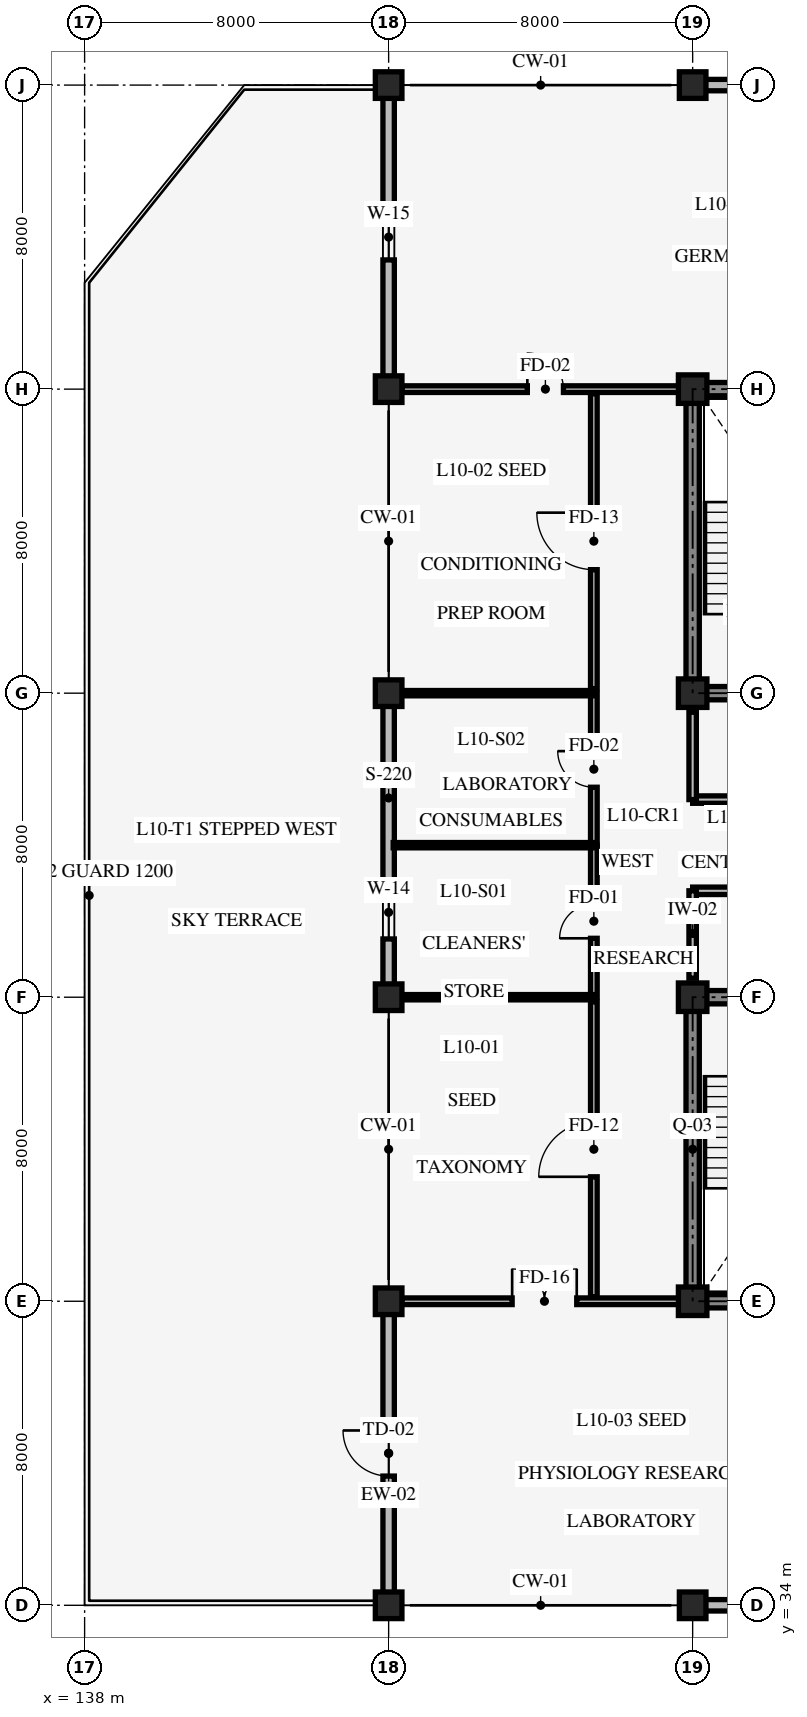
"""IFC4 building model, lengths in metres.
Left out: names, types, materials, properties, quantities, classifications, styles, units other than length and angle.
Written with IfcOpenShell. Run it as: python <this file> out.ifc"""

import sys

from ifc_helpers import new_model, si_unit, direction, frame, frame_2d, origin, origin_2d, place, context, subcontext, project, spatial, rectangle, extrude, element, fill, save


model = new_model("IFC4")
c1 = context("Model", 3, precision=1e-05, world=origin(), true_north=direction((0.0, 1.0)))
c2 = subcontext(c1, "Body", "Model", "MODEL_VIEW")
j1 = project(units=[si_unit("LENGTHUNIT", "METRE"), si_unit("PLANEANGLEUNIT", "RADIAN")], contexts=[c1])
p1 = place(None, origin())
s1 = spatial("IfcSite", under=j1, at=p1, CompositionType="ELEMENT")
p2 = place(p1, origin())
s2 = spatial("IfcBuilding", under=s1, at=p2, CompositionType="ELEMENT")
p3 = place(p2, frame((0.0, 0.0, 40.2)))
s3 = spatial("IfcBuildingStorey", under=s2, at=p3, CompositionType="ELEMENT", Elevation=40.2)
p4 = place(p3, frame((154.0, 42.0, 0.0), z_axis=(0.0, 0.0, 1.0), x_axis=(1.0, 0.0, 0.0)))
e1 = element("IfcWall", 1, at=p4, inside=s3, PredefinedType="SHEAR", context=c2, shape_type="SweptSolid", body=[
    extrude(rectangle(XDim=8.0, YDim=0.35, at=frame_2d((4.0, 0.0))), origin(), (0.0, 0.0, 1.0), 3.95),
])
p5 = place(p3, frame((162.0, 50.0, 0.0), z_axis=(0.0, 0.0, 1.0), x_axis=(-1.0, 0.0, 0.0)))
e2 = element("IfcWall", 2, at=p5, inside=s3, PredefinedType="SHEAR", context=c2, shape_type="SweptSolid", body=[
    extrude(rectangle(XDim=8.0, YDim=0.35, at=frame_2d((4.0, 0.0))), origin(), (0.0, 0.0, 1.0), 3.95),
])
p6 = place(p5, frame((5.3, 0.0, 0.0)))
e3 = element("IfcOpeningElement", 3, at=p6, cuts=e2, PredefinedType="OPENING", context=c2, shape_type="SweptSolid", body=[
    extrude(rectangle(XDim=1.3, YDim=2.15, at=frame_2d((0.65, 1.075))), frame((0.0, 0.185, 0.0), z_axis=(0.0, -1.0, 0.0), x_axis=(1.0, 0.0, 0.0)), (0.0, 0.0, 1.0), 0.37),
])
p7 = place(p5, frame((1.45, 0.0, 0.0)))
e4 = element("IfcOpeningElement", 4, at=p7, cuts=e2, PredefinedType="OPENING", context=c2, shape_type="SweptSolid", body=[
    extrude(rectangle(XDim=1.1, YDim=2.2, at=frame_2d((0.55, 1.1))), frame((0.0, 0.185, 0.0), z_axis=(0.0, -1.0, 0.0), x_axis=(1.0, 0.0, 0.0)), (0.0, 0.0, 1.0), 0.37),
])
p8 = place(p3, frame((154.0, 50.0, 0.0), z_axis=(0.0, 0.0, 1.0), x_axis=(0.0, -1.0, 0.0)))
e5 = element("IfcWall", 5, at=p8, inside=s3, PredefinedType="SHEAR", context=c2, shape_type="SweptSolid", body=[
    extrude(rectangle(XDim=8.0, YDim=0.35, at=frame_2d((4.0, 0.0))), origin(), (0.0, 0.0, 1.0), 3.95),
])
p9 = place(p3, frame((154.0, 58.0, 0.0), z_axis=(0.0, 0.0, 1.0), x_axis=(1.0, 0.0, 0.0)))
e6 = element("IfcWall", 6, at=p9, inside=s3, PredefinedType="SHEAR", context=c2, shape_type="SweptSolid", body=[
    extrude(rectangle(XDim=8.0, YDim=0.35, at=frame_2d((4.0, 0.0))), origin(), (0.0, 0.0, 1.0), 3.95),
])
p10 = place(p9, frame((1.4, 0.0, 0.0)))
e7 = element("IfcOpeningElement", 7, at=p10, cuts=e6, PredefinedType="OPENING", context=c2, shape_type="SweptSolid", body=[
    extrude(rectangle(XDim=1.3, YDim=2.15, at=frame_2d((0.65, 1.075))), frame((0.0, 0.185, 0.0), z_axis=(0.0, -1.0, 0.0), x_axis=(1.0, 0.0, 0.0)), (0.0, 0.0, 1.0), 0.37),
])
p11 = place(p9, frame((5.3, 0.0, 0.0)))
e8 = element("IfcOpeningElement", 8, at=p11, cuts=e6, PredefinedType="OPENING", context=c2, shape_type="SweptSolid", body=[
    extrude(rectangle(XDim=1.1, YDim=2.2, at=frame_2d((0.55, 1.1))), frame((0.0, 0.185, 0.0), z_axis=(0.0, -1.0, 0.0), x_axis=(1.0, 0.0, 0.0)), (0.0, 0.0, 1.0), 0.37),
])
for number, where, z_axis, x_axis in (
    (9, (162.0, 66.0, 0.0), (0.0, 0.0, 1.0), (-1.0, 0.0, 0.0)),
    (10, (154.0, 66.0, 0.0), (0.0, 0.0, 1.0), (0.0, -1.0, 0.0)),
):
    element("IfcWall", number, at=place(p3, frame(where, z_axis=z_axis, x_axis=x_axis)), inside=s3, PredefinedType="SHEAR", context=c2, shape_type="SweptSolid", body=[
        extrude(rectangle(XDim=8.0, YDim=0.35, at=frame_2d((4.0, 0.0))), origin(), (0.0, 0.0, 1.0), 3.95),
    ])
for number, where, z_axis, x_axis in (
    (11, (146.0, 34.0, 0.0), (0.0, 0.0, 1.0), (1.0, 0.0, 0.0)),
    (12, (146.0, 42.0, 0.0), (0.0, 0.0, 1.0), (1.0, 0.0, 0.0)),
    (13, (146.0, 50.0, 0.0), (0.0, 0.0, 1.0), (1.0, 0.0, 0.0)),
    (14, (146.0, 58.0, 0.0), (0.0, 0.0, 1.0), (1.0, 0.0, 0.0)),
    (15, (146.0, 66.0, 0.0), (0.0, 0.0, 1.0), (1.0, 0.0, 0.0)),
    (16, (146.0, 74.0, 0.0), (0.0, 0.0, 1.0), (1.0, 0.0, 0.0)),
    (17, (154.0, 34.0, 0.0), (0.0, 0.0, 1.0), (1.0, 0.0, 0.0)),
):
    element("IfcColumn", number, at=place(p3, frame(where, z_axis=z_axis, x_axis=x_axis)), inside=s3, PredefinedType="COLUMN", context=c2, shape_type="SweptSolid", body=[
        extrude(rectangle(XDim=0.7, YDim=0.7, at=origin_2d()), origin(), (0.0, 0.0, 1.0), 4.2),
    ])
for number, where, z_axis, x_axis in (
    (18, (154.0, 42.0, 0.0), (0.0, 0.0, 1.0), (1.0, 0.0, 0.0)),
    (19, (154.0, 50.0, 0.0), (0.0, 0.0, 1.0), (1.0, 0.0, 0.0)),
    (20, (154.0, 58.0, 0.0), (0.0, 0.0, 1.0), (1.0, 0.0, 0.0)),
    (21, (154.0, 66.0, 0.0), (0.0, 0.0, 1.0), (1.0, 0.0, 0.0)),
):
    element("IfcColumn", number, at=place(p3, frame(where, z_axis=z_axis, x_axis=x_axis)), inside=s3, PredefinedType="COLUMN", context=c2, shape_type="SweptSolid", body=[
        extrude(rectangle(XDim=0.75, YDim=0.75, at=origin_2d()), origin(), (0.0, 0.0, 1.0), 4.2),
    ])
p12 = place(p3, frame((154.0, 74.0, 0.0), z_axis=(0.0, 0.0, 1.0), x_axis=(1.0, 0.0, 0.0)))
e22 = element("IfcColumn", 22, at=p12, inside=s3, PredefinedType="COLUMN", context=c2, shape_type="SweptSolid", body=[
    extrude(rectangle(XDim=0.7, YDim=0.7, at=origin_2d()), origin(), (0.0, 0.0, 1.0), 4.2),
])
p13 = place(p3, frame((162.0, 34.0, 0.0), z_axis=(0.0, 0.0, 1.0), x_axis=(-1.0, 0.0, 0.0)))
e23 = element("IfcWall", 23, at=p13, inside=s3, PredefinedType="STANDARD", context=c2, shape_type="SweptSolid", body=[
    extrude(rectangle(XDim=8.0, YDim=0.3, at=frame_2d((4.0, 0.0))), origin(), (0.0, 0.0, 1.0), 3.09),
])
p14 = place(p13, frame((3.0, 0.0, 0.85)))
e24 = element("IfcOpeningElement", 24, at=p14, cuts=e23, PredefinedType="OPENING", context=c2, shape_type="SweptSolid", body=[
    extrude(rectangle(XDim=2.0, YDim=1.5, at=frame_2d((1.0, 0.75))), frame((0.0, 0.16, 0.0), z_axis=(0.0, -1.0, 0.0), x_axis=(1.0, 0.0, 0.0)), (0.0, 0.0, 1.0), 0.32),
])
p15 = place(p3, frame((146.0, 34.0, 0.0), z_axis=(0.0, 0.0, 1.0), x_axis=(0.0, 1.0, 0.0)))
e25 = element("IfcWall", 25, at=p15, inside=s3, PredefinedType="STANDARD", context=c2, shape_type="SweptSolid", body=[
    extrude(rectangle(XDim=8.0, YDim=0.3, at=frame_2d((4.0, 0.0))), origin(), (0.0, 0.0, 1.0), 3.14),
])
p16 = place(p15, frame((3.4, 0.0, 0.0)))
e26 = element("IfcOpeningElement", 26, at=p16, cuts=e25, PredefinedType="OPENING", context=c2, shape_type="SweptSolid", body=[
    extrude(rectangle(XDim=1.2, YDim=2.2, at=frame_2d((0.6, 1.1))), frame((0.0, 0.16, 0.0), z_axis=(0.0, -1.0, 0.0), x_axis=(1.0, 0.0, 0.0)), (0.0, 0.0, 1.0), 0.32),
])
p17 = place(p3, frame((146.0, 50.0, 0.0), z_axis=(0.0, 0.0, 1.0), x_axis=(0.0, 1.0, 0.0)))
e27 = element("IfcWall", 27, at=p17, inside=s3, PredefinedType="STANDARD", context=c2, shape_type="SweptSolid", body=[
    extrude(rectangle(XDim=8.0, YDim=0.3, at=frame_2d((4.0, 0.0))), origin(), (0.0, 0.0, 1.0), 3.14),
])
p18 = place(p17, frame((1.533, 0.0, 0.85)))
e28 = element("IfcOpeningElement", 28, at=p18, cuts=e27, PredefinedType="OPENING", context=c2, shape_type="SweptSolid", body=[
    extrude(rectangle(XDim=1.4, YDim=1.9, at=frame_2d((0.7, 0.95))), frame((0.0, 0.16, 0.0), z_axis=(0.0, -1.0, 0.0), x_axis=(1.0, 0.0, 0.0)), (0.0, 0.0, 1.0), 0.32),
])
p19 = place(p3, frame((146.0, 66.0, 0.0), z_axis=(0.0, 0.0, 1.0), x_axis=(0.0, 1.0, 0.0)))
e29 = element("IfcWall", 29, at=p19, inside=s3, PredefinedType="STANDARD", context=c2, shape_type="SweptSolid", body=[
    extrude(rectangle(XDim=8.0, YDim=0.3, at=frame_2d((4.0, 0.0))), origin(), (0.0, 0.0, 1.0), 3.14),
])
p20 = place(p19, frame((3.4, 0.0, 0.85)))
e30 = element("IfcOpeningElement", 30, at=p20, cuts=e29, PredefinedType="OPENING", context=c2, shape_type="SweptSolid", body=[
    extrude(rectangle(XDim=1.2, YDim=1.8, at=frame_2d((0.6, 0.9))), frame((0.0, 0.16, 0.0), z_axis=(0.0, -1.0, 0.0), x_axis=(1.0, 0.0, 0.0)), (0.0, 0.0, 1.0), 0.32),
])
p21 = place(p3, frame((154.0, 74.0, 0.0), z_axis=(0.0, 0.0, 1.0), x_axis=(1.0, 0.0, 0.0)))
e31 = element("IfcWall", 31, at=p21, inside=s3, PredefinedType="STANDARD", context=c2, shape_type="SweptSolid", body=[
    extrude(rectangle(XDim=8.0, YDim=0.3, at=frame_2d((4.0, 0.0))), origin(), (0.0, 0.0, 1.0), 3.09),
])
p22 = place(p21, frame((3.5, 0.0, 0.85)))
e32 = element("IfcOpeningElement", 32, at=p22, cuts=e31, PredefinedType="OPENING", context=c2, shape_type="SweptSolid", body=[
    extrude(rectangle(XDim=1.0, YDim=1.5, at=frame_2d((0.5, 0.75))), frame((0.0, 0.16, 0.0), z_axis=(0.0, -1.0, 0.0), x_axis=(1.0, 0.0, 0.0)), (0.0, 0.0, 1.0), 0.32),
])
p23 = place(p3, frame((154.0, 52.8, 0.0), z_axis=(0.0, 0.0, 1.0), x_axis=(1.0, 0.0, 0.0)))
e33 = element("IfcWall", 33, at=p23, inside=s3, PredefinedType="STANDARD", context=c2, shape_type="SweptSolid", body=[
    extrude(rectangle(XDim=7.6, YDim=0.195, at=frame_2d((3.8, 0.0))), origin(), (0.0, 0.0, 1.0), 3.9),
])
p24 = place(p23, frame((2.8, 0.0, 0.0)))
e34 = element("IfcOpeningElement", 34, at=p24, cuts=e33, PredefinedType="OPENING", context=c2, shape_type="SweptSolid", body=[
    extrude(rectangle(XDim=1.4, YDim=2.2, at=frame_2d((0.7, 1.1))), frame((0.0, 0.107, 0.0), z_axis=(0.0, -1.0, 0.0), x_axis=(1.0, 0.0, 0.0)), (0.0, 0.0, 1.0), 0.215),
])
p25 = place(p3, frame((154.0, 50.5, 0.0), z_axis=(0.0, 0.0, 1.0), x_axis=(0.0, 1.0, 0.0)))
e35 = element("IfcWall", 35, at=p25, inside=s3, PredefinedType="STANDARD", context=c2, shape_type="SweptSolid", body=[
    extrude(rectangle(XDim=2.3, YDim=0.195, at=frame_2d((1.15, 0.0))), origin(), (0.0, 0.0, 1.0), 3.14),
])
p26 = place(p3, frame((154.0, 55.2, 0.0), z_axis=(0.0, 0.0, 1.0), x_axis=(1.0, 0.0, 0.0)))
e36 = element("IfcWall", 36, at=p26, inside=s3, PredefinedType="STANDARD", context=c2, shape_type="SweptSolid", body=[
    extrude(rectangle(XDim=7.6, YDim=0.195, at=frame_2d((3.8, 0.0))), origin(), (0.0, 0.0, 1.0), 3.9),
])
p27 = place(p26, frame((2.8, 0.0, 0.0)))
e37 = element("IfcOpeningElement", 37, at=p27, cuts=e36, PredefinedType="OPENING", context=c2, shape_type="SweptSolid", body=[
    extrude(rectangle(XDim=1.2, YDim=2.1, at=frame_2d((0.6, 1.05))), frame((0.0, 0.107, 0.0), z_axis=(0.0, -1.0, 0.0), x_axis=(1.0, 0.0, 0.0)), (0.0, 0.0, 1.0), 0.215),
])
p28 = place(p3, frame((154.0, 55.2, 0.0), z_axis=(0.0, 0.0, 1.0), x_axis=(0.0, 1.0, 0.0)))
e38 = element("IfcWall", 38, at=p28, inside=s3, PredefinedType="STANDARD", context=c2, shape_type="SweptSolid", body=[
    extrude(rectangle(XDim=2.3, YDim=0.195, at=frame_2d((1.15, 0.0))), origin(), (0.0, 0.0, 1.0), 3.14),
])
p29 = place(p3, frame((151.4, 42.12, 0.0), z_axis=(0.0, 0.0, 1.0), x_axis=(0.0, 1.0, 0.0)))
e39 = element("IfcWall", 39, at=p29, inside=s3, PredefinedType="STANDARD", context=c2, shape_type="SweptSolid", body=[
    extrude(rectangle(XDim=7.76, YDim=0.175, at=frame_2d((3.88, 0.0))), origin(), (0.0, 0.0, 1.0), 3.9),
])
p30 = place(p29, frame((3.155, 0.0, 0.0)))
e40 = element("IfcOpeningElement", 40, at=p30, cuts=e39, PredefinedType="OPENING", context=c2, shape_type="SweptSolid", body=[
    extrude(rectangle(XDim=1.45, YDim=2.2, at=frame_2d((0.725, 1.1))), frame((0.0, 0.098, 0.0), z_axis=(0.0, -1.0, 0.0), x_axis=(1.0, 0.0, 0.0)), (0.0, 0.0, 1.0), 0.195),
])
p31 = place(p3, frame((151.4, 58.12, 0.0), z_axis=(0.0, 0.0, 1.0), x_axis=(0.0, 1.0, 0.0)))
e41 = element("IfcWall", 41, at=p31, inside=s3, PredefinedType="STANDARD", context=c2, shape_type="SweptSolid", body=[
    extrude(rectangle(XDim=7.76, YDim=0.175, at=frame_2d((3.88, 0.0))), origin(), (0.0, 0.0, 1.0), 3.9),
])
p32 = place(p31, frame((3.13, 0.0, 0.0)))
e42 = element("IfcOpeningElement", 42, at=p32, cuts=e41, PredefinedType="OPENING", context=c2, shape_type="SweptSolid", body=[
    extrude(rectangle(XDim=1.5, YDim=2.2, at=frame_2d((0.75, 1.1))), frame((0.0, 0.098, 0.0), z_axis=(0.0, -1.0, 0.0), x_axis=(1.0, 0.0, 0.0)), (0.0, 0.0, 1.0), 0.195),
])
p33 = place(p3, frame((151.4, 50.0, 0.0), z_axis=(0.0, 0.0, 1.0), x_axis=(0.0, 1.0, 0.0)))
e43 = element("IfcWall", 43, at=p33, inside=s3, PredefinedType="STANDARD", context=c2, shape_type="SweptSolid", body=[
    extrude(rectangle(XDim=4.0, YDim=0.175, at=frame_2d((2.0, 0.0))), origin(), (0.0, 0.0, 1.0), 3.9),
])
p34 = place(p33, frame((1.55, 0.0, 0.0)))
e44 = element("IfcOpeningElement", 44, at=p34, cuts=e43, PredefinedType="OPENING", context=c2, shape_type="SweptSolid", body=[
    extrude(rectangle(XDim=0.9, YDim=2.1, at=frame_2d((0.45, 1.05))), frame((0.0, 0.098, 0.0), z_axis=(0.0, -1.0, 0.0), x_axis=(1.0, 0.0, 0.0)), (0.0, 0.0, 1.0), 0.195),
])
p35 = place(p3, frame((151.4, 54.0, 0.0), z_axis=(0.0, 0.0, 1.0), x_axis=(0.0, 1.0, 0.0)))
e45 = element("IfcWall", 45, at=p35, inside=s3, PredefinedType="STANDARD", context=c2, shape_type="SweptSolid", body=[
    extrude(rectangle(XDim=4.0, YDim=0.175, at=frame_2d((2.0, 0.0))), origin(), (0.0, 0.0, 1.0), 3.9),
])
p36 = place(p35, frame((1.525, 0.0, 0.0)))
e46 = element("IfcOpeningElement", 46, at=p36, cuts=e45, PredefinedType="OPENING", context=c2, shape_type="SweptSolid", body=[
    extrude(rectangle(XDim=0.95, YDim=2.1, at=frame_2d((0.475, 1.05))), frame((0.0, 0.098, 0.0), z_axis=(0.0, -1.0, 0.0), x_axis=(1.0, 0.0, 0.0)), (0.0, 0.0, 1.0), 0.195),
])
p37 = place(p3, frame((146.12, 50.0, 0.0), z_axis=(0.0, 0.0, 1.0), x_axis=(1.0, 0.0, 0.0)))
e47 = element("IfcWall", 47, at=p37, inside=s3, PredefinedType="STANDARD", context=c2, shape_type="SweptSolid", body=[
    extrude(rectangle(XDim=5.28, YDim=0.14, at=frame_2d((2.64, 0.0))), origin(), (0.0, 0.0, 1.0), 3.09),
])
p38 = place(p3, frame((146.12, 54.0, 0.0), z_axis=(0.0, 0.0, 1.0), x_axis=(1.0, 0.0, 0.0)))
e48 = element("IfcWall", 48, at=p38, inside=s3, PredefinedType="STANDARD", context=c2, shape_type="SweptSolid", body=[
    extrude(rectangle(XDim=5.28, YDim=0.14, at=frame_2d((2.64, 0.0))), origin(), (0.0, 0.0, 1.0), 3.9),
])
p39 = place(p3, frame((146.12, 58.0, 0.0), z_axis=(0.0, 0.0, 1.0), x_axis=(1.0, 0.0, 0.0)))
e49 = element("IfcWall", 49, at=p39, inside=s3, PredefinedType="STANDARD", context=c2, shape_type="SweptSolid", body=[
    extrude(rectangle(XDim=5.28, YDim=0.14, at=frame_2d((2.64, 0.0))), origin(), (0.0, 0.0, 1.0), 3.09),
])
p40 = place(p3, frame((146.35, 42.0, 0.0), z_axis=(0.0, 0.0, 1.0), x_axis=(1.0, 0.0, 0.0)))
e50 = element("IfcWall", 50, at=p40, inside=s3, PredefinedType="STANDARD", context=c2, shape_type="SweptSolid", body=[
    extrude(rectangle(XDim=7.3, YDim=0.175, at=frame_2d((3.65, 0.0))), origin(), (0.0, 0.0, 1.0), 3.09),
])
p41 = place(p40, frame((2.9, 0.0, 0.0)))
e51 = element("IfcOpeningElement", 51, at=p41, cuts=e50, PredefinedType="OPENING", context=c2, shape_type="SweptSolid", body=[
    extrude(rectangle(XDim=1.7, YDim=2.3, at=frame_2d((0.85, 1.15))), frame((0.0, 0.098, 0.0), z_axis=(0.0, -1.0, 0.0), x_axis=(1.0, 0.0, 0.0)), (0.0, 0.0, 1.0), 0.195),
])
p42 = place(p3, frame((146.35, 66.0, 0.0), z_axis=(0.0, 0.0, 1.0), x_axis=(1.0, 0.0, 0.0)))
e52 = element("IfcWall", 52, at=p42, inside=s3, PredefinedType="STANDARD", context=c2, shape_type="SweptSolid", body=[
    extrude(rectangle(XDim=7.3, YDim=0.175, at=frame_2d((3.65, 0.0))), origin(), (0.0, 0.0, 1.0), 3.09),
])
p43 = place(p42, frame((3.3, 0.0, 0.0)))
e53 = element("IfcOpeningElement", 53, at=p43, cuts=e52, PredefinedType="OPENING", context=c2, shape_type="SweptSolid", body=[
    extrude(rectangle(XDim=0.95, YDim=2.1, at=frame_2d((0.475, 1.05))), frame((0.0, 0.098, 0.0), z_axis=(0.0, -1.0, 0.0), x_axis=(1.0, 0.0, 0.0)), (0.0, 0.0, 1.0), 0.195),
])
p44 = place(p16, origin())
e54 = element("IfcDoor", 54, at=p44, inside=s3, OperationType="SINGLE_SWING_RIGHT", PredefinedType="DOOR", context=c2, shape_type="SweptSolid", body=[
    extrude(rectangle(XDim=1.2, YDim=2.2, at=frame_2d((0.6, 1.1))), frame((0.0, 0.025, 0.0), z_axis=(0.0, -1.0, 0.0), x_axis=(1.0, 0.0, 0.0)), (0.0, 0.0, 1.0), 0.05),
])
fill(e26, e54)
p45 = place(p18, origin())
e55 = element("IfcWindow", 55, at=p45, inside=s3, PartitioningType="SINGLE_PANEL", PredefinedType="WINDOW", context=c2, shape_type="SweptSolid", body=[
    extrude(rectangle(XDim=1.4, YDim=1.9, at=frame_2d((0.7, 0.95))), frame((0.0, 0.03, 0.0), z_axis=(0.0, -1.0, 0.0), x_axis=(1.0, 0.0, 0.0)), (0.0, 0.0, 1.0), 0.06),
])
fill(e28, e55)
p46 = place(p20, origin())
e56 = element("IfcWindow", 56, at=p46, inside=s3, PartitioningType="SINGLE_PANEL", PredefinedType="WINDOW", context=c2, shape_type="SweptSolid", body=[
    extrude(rectangle(XDim=1.2, YDim=1.8, at=frame_2d((0.6, 0.9))), frame((0.0, 0.03, 0.0), z_axis=(0.0, -1.0, 0.0), x_axis=(1.0, 0.0, 0.0)), (0.0, 0.0, 1.0), 0.06),
])
fill(e30, e56)
p47 = place(p30, origin())
e57 = element("IfcDoor", 57, at=p47, inside=s3, OperationType="SINGLE_SWING_LEFT", PredefinedType="DOOR", context=c2, shape_type="SweptSolid", body=[
    extrude(rectangle(XDim=1.45, YDim=2.2, at=frame_2d((0.725, 1.1))), frame((0.0, 0.025, 0.0), z_axis=(0.0, -1.0, 0.0), x_axis=(1.0, 0.0, 0.0)), (0.0, 0.0, 1.0), 0.05),
])
fill(e40, e57)
p48 = place(p32, origin())
e58 = element("IfcDoor", 58, at=p48, inside=s3, OperationType="SINGLE_SWING_RIGHT", PredefinedType="DOOR", context=c2, shape_type="SweptSolid", body=[
    extrude(rectangle(XDim=1.5, YDim=2.2, at=frame_2d((0.75, 1.1))), frame((0.0, 0.025, 0.0), z_axis=(0.0, -1.0, 0.0), x_axis=(1.0, 0.0, 0.0)), (0.0, 0.0, 1.0), 0.05),
])
fill(e42, e58)
p49 = place(p34, origin())
e59 = element("IfcDoor", 59, at=p49, inside=s3, OperationType="SINGLE_SWING_LEFT", PredefinedType="DOOR", context=c2, shape_type="SweptSolid", body=[
    extrude(rectangle(XDim=0.9, YDim=2.1, at=frame_2d((0.45, 1.05))), frame((0.0, 0.025, 0.0), z_axis=(0.0, -1.0, 0.0), x_axis=(1.0, 0.0, 0.0)), (0.0, 0.0, 1.0), 0.05),
])
fill(e44, e59)
p50 = place(p36, origin())
e60 = element("IfcDoor", 60, at=p50, inside=s3, OperationType="SINGLE_SWING_RIGHT", PredefinedType="DOOR", context=c2, shape_type="SweptSolid", body=[
    extrude(rectangle(XDim=0.95, YDim=2.1, at=frame_2d((0.475, 1.05))), frame((0.0, 0.025, 0.0), z_axis=(0.0, -1.0, 0.0), x_axis=(1.0, 0.0, 0.0)), (0.0, 0.0, 1.0), 0.05),
])
fill(e46, e60)
p51 = place(p41, origin())
e61 = element("IfcDoor", 61, at=p51, inside=s3, OperationType="DOUBLE_DOOR_SINGLE_SWING", PredefinedType="DOOR", context=c2, shape_type="SweptSolid", body=[
    extrude(rectangle(XDim=1.7, YDim=2.3, at=frame_2d((0.85, 1.15))), frame((0.0, 0.025, 0.0), z_axis=(0.0, -1.0, 0.0), x_axis=(1.0, 0.0, 0.0)), (0.0, 0.0, 1.0), 0.05),
])
fill(e51, e61)
p52 = place(p43, origin())
e62 = element("IfcDoor", 62, at=p52, inside=s3, OperationType="SINGLE_SWING_LEFT", PredefinedType="DOOR", context=c2, shape_type="SweptSolid", body=[
    extrude(rectangle(XDim=0.95, YDim=2.1, at=frame_2d((0.475, 1.05))), frame((0.0, 0.025, 0.0), z_axis=(0.0, -1.0, 0.0), x_axis=(1.0, 0.0, 0.0)), (0.0, 0.0, 1.0), 0.05),
])
fill(e53, e62)
save(model, sys.argv[1])
